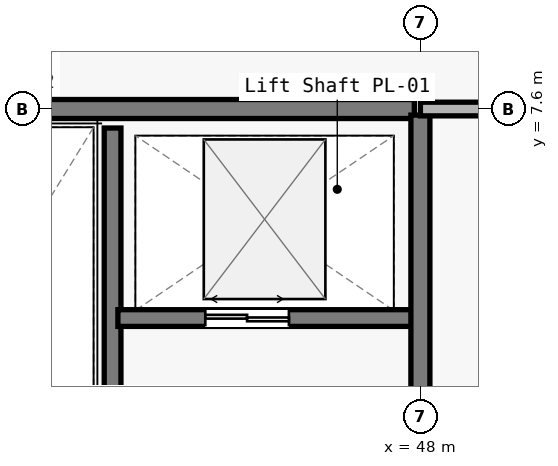
"""IFC4 building model, lengths in metres.
Left out: names, types, materials, properties, quantities, classifications, styles, units other than length and angle.
Written with IfcOpenShell. Run it as: python <this file> out.ifc"""

import sys

from ifc_helpers import new_model, si_unit, direction, frame, frame_2d, origin, place, context, subcontext, project, spatial, rectangle, extrude, element, fill, save


model = new_model("IFC4")
c1 = context("Model", 3, precision=1e-05, world=origin(), true_north=direction((0.0, 1.0)))
c2 = subcontext(c1, "Body", "Model", "MODEL_VIEW")
j1 = project(units=[si_unit("LENGTHUNIT", "METRE"), si_unit("PLANEANGLEUNIT", "RADIAN")], contexts=[c1])
p1 = place(None, origin())
s1 = spatial("IfcSite", under=j1, at=p1, CompositionType="ELEMENT")
p2 = place(p1, origin())
s2 = spatial("IfcBuilding", under=s1, at=p2, CompositionType="ELEMENT")
p3 = place(p2, frame((0.0, 0.0, 19.8)))
s3 = spatial("IfcBuildingStorey", under=s2, at=p3, CompositionType="ELEMENT", Elevation=19.8)
p4 = place(p3, frame((40.15, 7.6, 0.0), z_axis=(0.0, 0.0, 1.0), x_axis=(1.0, 0.0, 0.0)))
e1 = element("IfcWall", 1, at=p4, inside=s3, PredefinedType="SOLIDWALL", context=c2, shape_type="SweptSolid", body=[
    extrude(rectangle(XDim=7.77, YDim=0.25, at=frame_2d((3.885, 0.0))), origin(), (0.0, 0.0, 1.0), 4.54),
])
p5 = place(p3, frame((43.95, 0.25, 0.0), z_axis=(0.0, 0.0, 1.0), x_axis=(0.0, 1.0, 0.0)))
e2 = element("IfcWall", 2, at=p5, inside=s3, PredefinedType="SOLIDWALL", context=c2, shape_type="SweptSolid", body=[
    extrude(rectangle(XDim=7.1, YDim=0.22, at=frame_2d((3.55, 0.0))), origin(), (0.0, 0.0, 1.0), 4.54),
])
p6 = place(p5, frame((0.35, 0.0, 0.0)))
e3 = element("IfcOpeningElement", 3, at=p6, cuts=e2, PredefinedType="OPENING", context=c2, shape_type="SweptSolid", body=[
    extrude(rectangle(XDim=1.2, YDim=2.15, at=frame_2d((0.6, 1.075))), frame((0.0, 0.12, 0.0), z_axis=(0.0, -1.0, 0.0), x_axis=(1.0, 0.0, 0.0)), (0.0, 0.0, 1.0), 0.24),
])
p7 = place(p3, frame((44.02, 4.85, 0.0), z_axis=(0.0, 0.0, 1.0), x_axis=(1.0, 0.0, 0.0)))
e4 = element("IfcWall", 4, at=p7, inside=s3, PredefinedType="SOLIDWALL", context=c2, shape_type="SweptSolid", body=[
    extrude(rectangle(XDim=3.93, YDim=0.22, at=frame_2d((1.965, 0.0))), origin(), (0.0, 0.0, 1.0), 4.54),
])
p8 = place(p7, frame((1.15, 0.0, 0.0)))
e5 = element("IfcOpeningElement", 5, at=p8, cuts=e4, PredefinedType="OPENING", context=c2, shape_type="SweptSolid", body=[
    extrude(rectangle(XDim=1.1, YDim=2.2, at=frame_2d((0.55, 1.1))), frame((0.0, 0.12, 0.0), z_axis=(0.0, -1.0, 0.0), x_axis=(1.0, 0.0, 0.0)), (0.0, 0.0, 1.0), 0.24),
])
p9 = place(p3, frame((48.0, 0.08, 0.0), z_axis=(0.0, 0.0, 1.0), x_axis=(0.0, 1.0, 0.0)))
e6 = element("IfcWall", 6, at=p9, inside=s3, PredefinedType="SOLIDWALL", context=c2, shape_type="SweptSolid", body=[
    extrude(rectangle(XDim=7.44, YDim=0.25, at=frame_2d((3.72, 0.0))), origin(), (0.0, 0.0, 1.0), 4.54),
])
p10 = place(p9, frame((2.27, 0.0, 0.0)))
e7 = element("IfcOpeningElement", 7, at=p10, cuts=e6, PredefinedType="OPENING", context=c2, shape_type="SweptSolid", body=[
    extrude(rectangle(XDim=1.35, YDim=2.2, at=frame_2d((0.675, 1.1))), frame((0.0, 0.135, 0.0), z_axis=(0.0, -1.0, 0.0), x_axis=(1.0, 0.0, 0.0)), (0.0, 0.0, 1.0), 0.27),
])
p11 = place(p3, frame((48.0, 7.6, 0.0), z_axis=(0.0, 0.0, 1.0), x_axis=(1.0, 0.0, 0.0)))
e8 = element("IfcWall", 8, at=p11, inside=s3, PredefinedType="PARTITIONING", context=c2, shape_type="SweptSolid", body=[
    extrude(rectangle(XDim=7.88, YDim=0.18, at=frame_2d((3.94, 0.0))), origin(), (0.0, 0.0, 1.0), 4.54),
])
p12 = place(p8, origin())
e9 = element("IfcDoor", 9, at=p12, inside=s3, OperationType="DOUBLE_DOOR_SLIDING", PredefinedType="DOOR", context=c2, shape_type="SweptSolid", body=[
    extrude(rectangle(XDim=1.1, YDim=2.2, at=frame_2d((0.55, 1.1))), frame((0.0, 0.025, 0.0), z_axis=(0.0, -1.0, 0.0), x_axis=(1.0, 0.0, 0.0)), (0.0, 0.0, 1.0), 0.05),
])
fill(e5, e9)
save(model, sys.argv[1])
